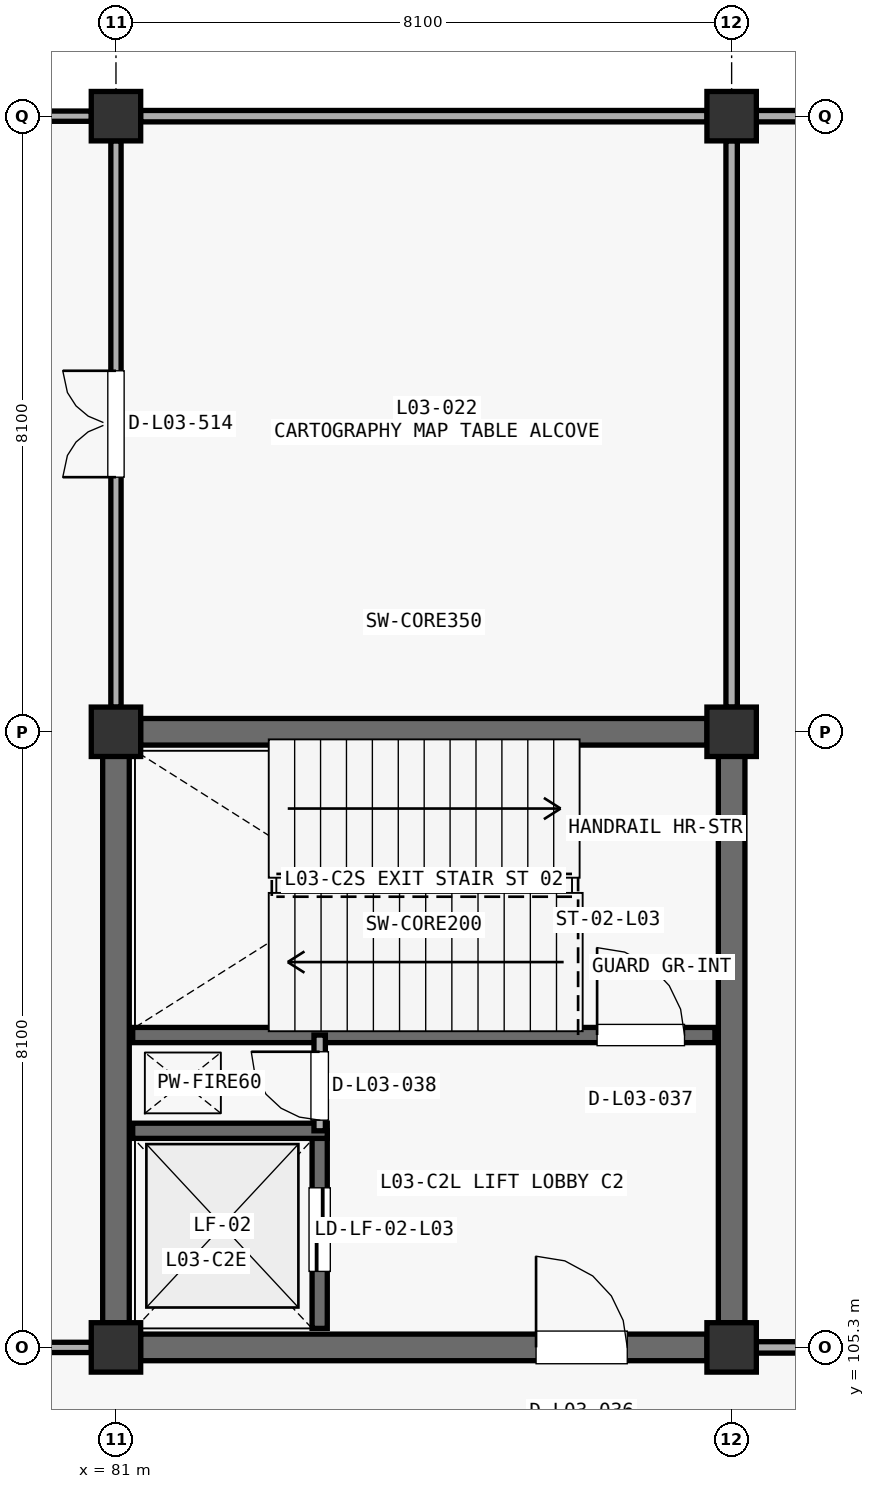
"""IFC4 building model, lengths in metres.
Left out: names, types, materials, properties, quantities, classifications, styles, units other than length and angle.
Written with IfcOpenShell. Run it as: python <this file> out.ifc"""

import sys

from ifc_helpers import new_model, si_unit, direction, frame, frame_2d, origin, origin_2d, place, context, subcontext, project, spatial, rectangle, extrude, element, fill, save


model = new_model("IFC4")
c1 = context("Model", 3, precision=1e-05, world=origin(), true_north=direction((0.0, 1.0)))
c2 = subcontext(c1, "Body", "Model", "MODEL_VIEW")
j1 = project(units=[si_unit("LENGTHUNIT", "METRE"), si_unit("PLANEANGLEUNIT", "RADIAN")], contexts=[c1])
p1 = place(None, origin())
s1 = spatial("IfcSite", under=j1, at=p1, CompositionType="ELEMENT")
p2 = place(p1, origin())
s2 = spatial("IfcBuilding", under=s1, at=p2, CompositionType="ELEMENT")
p3 = place(p2, frame((0.0, 0.0, 14.11)))
s3 = spatial("IfcBuildingStorey", under=s2, at=p3, CompositionType="ELEMENT", Elevation=14.11)
for number, where, z_axis, x_axis in (
    (1, (81.0, 105.3, 0.0), (0.0, 0.0, 1.0), (1.0, 0.0, 0.0)),
    (2, (81.0, 113.4, 0.0), (0.0, 0.0, 1.0), (1.0, 0.0, 0.0)),
    (3, (81.0, 121.5, 0.0), (0.0, 0.0, 1.0), (1.0, 0.0, 0.0)),
    (4, (89.1, 105.3, 0.0), (0.0, 0.0, 1.0), (1.0, 0.0, 0.0)),
    (5, (89.1, 113.4, 0.0), (0.0, 0.0, 1.0), (1.0, 0.0, 0.0)),
    (6, (89.1, 121.5, 0.0), (0.0, 0.0, 1.0), (1.0, 0.0, 0.0)),
):
    element("IfcColumn", number, at=place(p3, frame(where, z_axis=z_axis, x_axis=x_axis)), inside=s3, PredefinedType="COLUMN", context=c2, shape_type="SweptSolid", body=[
        extrude(rectangle(XDim=0.65, YDim=0.65, at=origin_2d()), origin(), (0.0, 0.0, 1.0), 4.42),
    ])
p4 = place(p3, frame((81.323, 113.4, 0.0), z_axis=(0.0, 0.0, 1.0), x_axis=(1.0, 0.0, 0.0)))
e7 = element("IfcWall", 7, at=p4, inside=s3, PredefinedType="SHEAR", context=c2, shape_type="SweptSolid", body=[
    extrude(rectangle(XDim=7.454, YDim=0.35, at=frame_2d((3.727, 0.0))), origin(), (0.0, 0.0, 1.0), 4.152),
])
for number, where, z_axis, x_axis in (
    (8, (81.0, 105.623, 0.0), (0.0, 0.0, 1.0), (0.0, 1.0, 0.0)),
    (9, (89.1, 105.623, 0.0), (0.0, 0.0, 1.0), (0.0, 1.0, 0.0)),
):
    element("IfcWall", number, at=place(p3, frame(where, z_axis=z_axis, x_axis=x_axis)), inside=s3, PredefinedType="SHEAR", context=c2, shape_type="SweptSolid", body=[
        extrude(rectangle(XDim=7.454, YDim=0.35, at=frame_2d((3.727, 0.0))), origin(), (0.0, 0.0, 1.0), 4.152),
    ])
p5 = place(p3, frame((81.323, 105.3, 0.0), z_axis=(0.0, 0.0, 1.0), x_axis=(1.0, 0.0, 0.0)))
e10 = element("IfcWall", 10, at=p5, inside=s3, PredefinedType="SHEAR", context=c2, shape_type="SweptSolid", body=[
    extrude(rectangle(XDim=7.454, YDim=0.35, at=frame_2d((3.727, 0.0))), origin(), (0.0, 0.0, 1.0), 4.152),
])
p6 = place(p5, frame((5.204, 0.0, 0.0)))
e11 = element("IfcOpeningElement", 11, at=p6, cuts=e10, PredefinedType="OPENING", context=c2, shape_type="SweptSolid", body=[
    extrude(rectangle(XDim=1.2, YDim=2.2, at=frame_2d((0.6, 1.1))), frame((0.0, 0.185, 0.0), z_axis=(0.0, -1.0, 0.0), x_axis=(1.0, 0.0, 0.0)), (0.0, 0.0, 1.0), 0.37),
])
p7 = place(p3, frame((81.22, 109.41, 0.0), z_axis=(0.0, 0.0, 1.0), x_axis=(1.0, 0.0, 0.0)))
e12 = element("IfcWall", 12, at=p7, inside=s3, PredefinedType="SHEAR", context=c2, shape_type="SweptSolid", body=[
    extrude(rectangle(XDim=7.66, YDim=0.2, at=frame_2d((3.83, 0.0))), origin(), (0.0, 0.0, 1.0), 4.152),
])
p8 = place(p7, frame((6.11, 0.0, 0.0)))
e13 = element("IfcOpeningElement", 13, at=p8, cuts=e12, PredefinedType="OPENING", context=c2, shape_type="SweptSolid", body=[
    extrude(rectangle(XDim=1.15, YDim=2.2, at=frame_2d((0.575, 1.1))), frame((0.0, 0.11, 0.0), z_axis=(0.0, -1.0, 0.0), x_axis=(1.0, 0.0, 0.0)), (0.0, 0.0, 1.0), 0.22),
])
p9 = place(p3, frame((83.68, 105.55, 0.0), z_axis=(0.0, 0.0, 1.0), x_axis=(0.0, 1.0, 0.0)))
e14 = element("IfcWall", 14, at=p9, inside=s3, PredefinedType="SHEAR", context=c2, shape_type="SweptSolid", body=[
    extrude(rectangle(XDim=2.6, YDim=0.2, at=frame_2d((1.3, 0.0))), origin(), (0.0, 0.0, 1.0), 4.152),
])
p10 = place(p9, frame((0.75, 0.0, 0.0)))
e15 = element("IfcOpeningElement", 15, at=p10, cuts=e14, PredefinedType="OPENING", context=c2, shape_type="SweptSolid", body=[
    extrude(rectangle(XDim=1.1, YDim=2.2, at=frame_2d((0.55, 1.1))), frame((0.0, 0.11, 0.0), z_axis=(0.0, -1.0, 0.0), x_axis=(1.0, 0.0, 0.0)), (0.0, 0.0, 1.0), 0.22),
])
p11 = place(p3, frame((81.22, 108.15, 0.0), z_axis=(0.0, 0.0, 1.0), x_axis=(1.0, 0.0, 0.0)))
e16 = element("IfcWall", 16, at=p11, inside=s3, PredefinedType="SHEAR", context=c2, shape_type="SweptSolid", body=[
    extrude(rectangle(XDim=2.56, YDim=0.2, at=frame_2d((1.28, 0.0))), origin(), (0.0, 0.0, 1.0), 4.152),
])
p12 = place(p3, frame((83.68, 108.15, 0.0), z_axis=(0.0, 0.0, 1.0), x_axis=(0.0, 1.0, 0.0)))
e17 = element("IfcWall", 17, at=p12, inside=s3, PredefinedType="PARTITIONING", context=c2, shape_type="SweptSolid", body=[
    extrude(rectangle(XDim=1.26, YDim=0.15, at=frame_2d((0.63, 0.0))), origin(), (0.0, 0.0, 1.0), 4.152),
])
p13 = place(p12, frame((0.14, 0.0, 0.0)))
e18 = element("IfcOpeningElement", 18, at=p13, cuts=e17, PredefinedType="OPENING", context=c2, shape_type="SweptSolid", body=[
    extrude(rectangle(XDim=0.9, YDim=2.15, at=frame_2d((0.45, 1.075))), frame((0.0, 0.085, 0.0), z_axis=(0.0, -1.0, 0.0), x_axis=(1.0, 0.0, 0.0)), (0.0, 0.0, 1.0), 0.17),
])
p14 = place(p3, frame((73.223, 105.3, 0.0), z_axis=(0.0, 0.0, 1.0), x_axis=(1.0, 0.0, 0.0)))
e19 = element("IfcWall", 19, at=p14, inside=s3, PredefinedType="PARTITIONING", context=c2, shape_type="SweptSolid", body=[
    extrude(rectangle(XDim=7.454, YDim=0.135, at=frame_2d((3.727, 0.0))), origin(), (0.0, 0.0, 1.0), 3.502),
])
p15 = place(p3, frame((81.0, 113.723, 0.0), z_axis=(0.0, 0.0, 1.0), x_axis=(0.0, 1.0, 0.0)))
e20 = element("IfcWall", 20, at=p15, inside=s3, PredefinedType="PARTITIONING", context=c2, shape_type="SweptSolid", body=[
    extrude(rectangle(XDim=7.454, YDim=0.135, at=frame_2d((3.727, 0.0))), origin(), (0.0, 0.0, 1.0), 3.302),
])
p16 = place(p15, frame((3.027, 0.0, 0.0)))
e21 = element("IfcOpeningElement", 21, at=p16, cuts=e20, PredefinedType="OPENING", context=c2, shape_type="SweptSolid", body=[
    extrude(rectangle(XDim=1.4, YDim=2.2, at=frame_2d((0.7, 1.1))), frame((0.0, 0.078, 0.0), z_axis=(0.0, -1.0, 0.0), x_axis=(1.0, 0.0, 0.0)), (0.0, 0.0, 1.0), 0.155),
])
p17 = place(p3, frame((73.223, 121.5, 0.0), z_axis=(0.0, 0.0, 1.0), x_axis=(1.0, 0.0, 0.0)))
e22 = element("IfcWall", 22, at=p17, inside=s3, PredefinedType="PARTITIONING", context=c2, shape_type="SweptSolid", body=[
    extrude(rectangle(XDim=7.454, YDim=0.135, at=frame_2d((3.727, 0.0))), origin(), (0.0, 0.0, 1.0), 3.737),
])
p18 = place(p3, frame((89.423, 105.3, 0.0), z_axis=(0.0, 0.0, 1.0), x_axis=(1.0, 0.0, 0.0)))
e23 = element("IfcWall", 23, at=p18, inside=s3, PredefinedType="PARTITIONING", context=c2, shape_type="SweptSolid", body=[
    extrude(rectangle(XDim=7.454, YDim=0.15, at=frame_2d((3.727, 0.0))), origin(), (0.0, 0.0, 1.0), 3.302),
])
p19 = place(p18, frame((2.907, 0.0, 0.0)))
e24 = element("IfcOpeningElement", 24, at=p19, cuts=e23, PredefinedType="OPENING", context=c2, shape_type="SweptSolid", body=[
    extrude(rectangle(XDim=1.64, YDim=2.25, at=frame_2d((0.82, 1.125))), frame((0.0, 0.085, 0.0), z_axis=(0.0, -1.0, 0.0), x_axis=(1.0, 0.0, 0.0)), (0.0, 0.0, 1.0), 0.17),
])
p20 = place(p3, frame((89.1, 113.723, 0.0), z_axis=(0.0, 0.0, 1.0), x_axis=(0.0, 1.0, 0.0)))
e25 = element("IfcWall", 25, at=p20, inside=s3, PredefinedType="PARTITIONING", context=c2, shape_type="SweptSolid", body=[
    extrude(rectangle(XDim=7.454, YDim=0.15, at=frame_2d((3.727, 0.0))), origin(), (0.0, 0.0, 1.0), 3.402),
])
p21 = place(p3, frame((89.423, 121.5, 0.0), z_axis=(0.0, 0.0, 1.0), x_axis=(1.0, 0.0, 0.0)))
e26 = element("IfcWall", 26, at=p21, inside=s3, PredefinedType="PARTITIONING", context=c2, shape_type="SweptSolid", body=[
    extrude(rectangle(XDim=7.454, YDim=0.15, at=frame_2d((3.727, 0.0))), origin(), (0.0, 0.0, 1.0), 3.402),
])
p22 = place(p3, frame((81.323, 121.5, 0.0), z_axis=(0.0, 0.0, 1.0), x_axis=(1.0, 0.0, 0.0)))
e27 = element("IfcWall", 27, at=p22, inside=s3, PredefinedType="PARTITIONING", context=c2, shape_type="SweptSolid", body=[
    extrude(rectangle(XDim=7.454, YDim=0.15, at=frame_2d((3.727, 0.0))), origin(), (0.0, 0.0, 1.0), 3.202),
])
p23 = place(p6, origin())
e28 = element("IfcDoor", 28, at=p23, inside=s3, OperationType="SINGLE_SWING_LEFT", PredefinedType="DOOR", context=c2, shape_type="SweptSolid", body=[
    extrude(rectangle(XDim=1.2, YDim=2.2, at=frame_2d((0.6, 1.1))), frame((0.0, 0.025, 0.0), z_axis=(0.0, -1.0, 0.0), x_axis=(1.0, 0.0, 0.0)), (0.0, 0.0, 1.0), 0.05),
])
fill(e11, e28)
p24 = place(p8, origin())
e29 = element("IfcDoor", 29, at=p24, inside=s3, OperationType="SINGLE_SWING_LEFT", PredefinedType="DOOR", context=c2, shape_type="SweptSolid", body=[
    extrude(rectangle(XDim=1.15, YDim=2.2, at=frame_2d((0.575, 1.1))), frame((0.0, 0.025, 0.0), z_axis=(0.0, -1.0, 0.0), x_axis=(1.0, 0.0, 0.0)), (0.0, 0.0, 1.0), 0.05),
])
fill(e13, e29)
p25 = place(p10, origin())
e30 = element("IfcDoor", 30, at=p25, inside=s3, OperationType="SLIDING_TO_LEFT", PredefinedType="DOOR", context=c2, shape_type="SweptSolid", body=[
    extrude(rectangle(XDim=1.1, YDim=2.2, at=frame_2d((0.55, 1.1))), frame((0.0, 0.025, 0.0), z_axis=(0.0, -1.0, 0.0), x_axis=(1.0, 0.0, 0.0)), (0.0, 0.0, 1.0), 0.05),
])
fill(e15, e30)
p26 = place(p13, origin())
e31 = element("IfcDoor", 31, at=p26, inside=s3, OperationType="SINGLE_SWING_RIGHT", PredefinedType="DOOR", context=c2, shape_type="SweptSolid", body=[
    extrude(rectangle(XDim=0.9, YDim=2.15, at=frame_2d((0.45, 1.075))), frame((0.0, 0.025, 0.0), z_axis=(0.0, -1.0, 0.0), x_axis=(1.0, 0.0, 0.0)), (0.0, 0.0, 1.0), 0.05),
])
fill(e18, e31)
p27 = place(p16, origin())
e32 = element("IfcDoor", 32, at=p27, inside=s3, OperationType="DOUBLE_SWING_LEFT", PredefinedType="DOOR", context=c2, shape_type="SweptSolid", body=[
    extrude(rectangle(XDim=1.4, YDim=2.2, at=frame_2d((0.7, 1.1))), frame((0.0, 0.025, 0.0), z_axis=(0.0, -1.0, 0.0), x_axis=(1.0, 0.0, 0.0)), (0.0, 0.0, 1.0), 0.05),
])
fill(e21, e32)
save(model, sys.argv[1])
